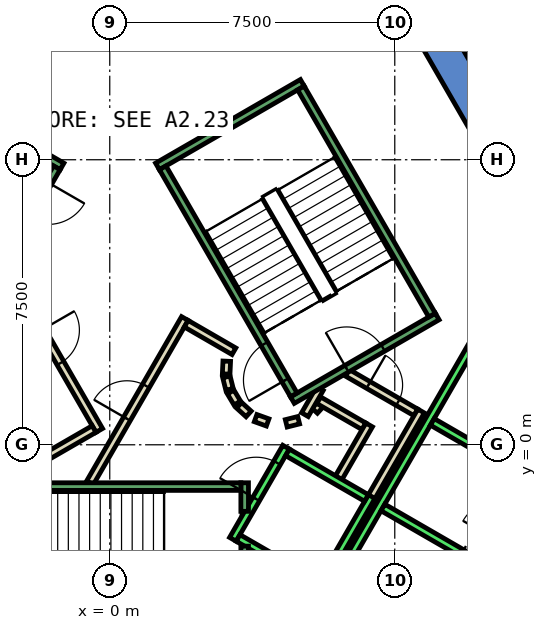
"""IFC4 building model, lengths in metres.
Left out: names, types, materials, properties, quantities, classifications, styles, units other than length and angle.
Written with IfcOpenShell. Run it as: python <this file> out.ifc"""

import sys

from ifc_helpers import new_model, si_unit, direction, frame, frame_2d, origin, place, context, subcontext, project, spatial, polyline, rectangle, outline, extrude, element, fill, save


model = new_model("IFC4")
c1 = context("Model", 3, precision=1e-05, world=origin(), true_north=direction((0.0, 1.0)))
c2 = subcontext(c1, "Body", "Model", "MODEL_VIEW")
j1 = project(units=[si_unit("LENGTHUNIT", "METRE"), si_unit("PLANEANGLEUNIT", "RADIAN")], contexts=[c1])
p1 = place(None, origin())
s1 = spatial("IfcSite", under=j1, at=p1, CompositionType="ELEMENT")
p2 = place(p1, origin())
s2 = spatial("IfcBuilding", under=s1, at=p2, CompositionType="ELEMENT")
p3 = place(p2, frame((0.0, 0.0, 111.8)))
s3 = spatial("IfcBuildingStorey", under=s2, at=p3, CompositionType="ELEMENT", Elevation=111.8)
p4 = place(p3, frame((0.0, 0.0, -0.4)))
e1 = element("IfcWall", 1, at=p4, inside=s3, PredefinedType="SHEAR", context=c2, shape_type="SweptSolid", body=[
    extrude(outline(polyline([(8.517, 11.748), (7.738, 11.298), (12.817, 2.5), (13.856, 2.5), (8.517, 11.748)])), origin(), (0.0, 0.0, 1.0), 4.2),
])
p5 = place(p3, frame((0.0, 0.0, -0.4)))
e2 = element("IfcWall", 2, at=p5, inside=s3, PredefinedType="SHEAR", context=c2, shape_type="SweptSolid", body=[
    extrude(outline(polyline([(10.717, -2.937), (9.938, -2.487), (9.288, -3.613), (10.067, -4.063), (10.717, -2.937)])), origin(), (0.0, 0.0, 1.0), 4.2),
])
p6 = place(p3, frame((5.39, 0.898, 0.0), z_axis=(0.0, 0.0, 1.0), x_axis=(0.673828488714, 0.738887791073, 0.0)))
e3 = element("IfcWall", 3, at=p6, inside=s3, PredefinedType="PARTITIONING", context=c2, shape_type="SweptSolid", body=[
    extrude(rectangle(XDim=0.263, YDim=0.2, at=frame_2d((0.131, 0.0))), origin(), (0.0, 0.0, 1.0), 3.8),
])
p7 = place(p3, frame((5.499, 1.172, 0.0), z_axis=(0.0, 0.0, 1.0), x_axis=(0.866333505267, -0.499465972466, 0.0)))
e4 = element("IfcWall", 4, at=p7, inside=s3, PredefinedType="PARTITIONING", context=c2, shape_type="SweptSolid", body=[
    extrude(rectangle(XDim=1.374, YDim=0.2, at=frame_2d((0.687, 0.0))), origin(), (0.0, 0.0, 1.0), 3.8),
])
p8 = place(p3, frame((6.826, 0.522, 0.0), z_axis=(0.0, 0.0, 1.0), x_axis=(-0.500016722714, -0.866015748706, 0.0)))
e5 = element("IfcWall", 5, at=p8, inside=s3, PredefinedType="PARTITIONING", context=c2, shape_type="SweptSolid", body=[
    extrude(rectangle(XDim=1.7, YDim=0.2, at=frame_2d((0.85, 0.0))), origin(), (0.0, 0.0, 1.0), 3.8),
])
p9 = place(p3, frame((6.25, 1.894, 0.0), z_axis=(0.0, 0.0, 1.0), x_axis=(0.866043184279, -0.499969202016, 0.0)))
e6 = element("IfcWall", 6, at=p9, inside=s3, PredefinedType="PARTITIONING", context=c2, shape_type="SweptSolid", body=[
    extrude(rectangle(XDim=2.084, YDim=0.2, at=frame_2d((1.042, 0.0))), origin(), (0.0, 0.0, 1.0), 3.8),
])
p10 = place(p9, frame((0.642, 0.0, 0.0)))
e7 = element("IfcOpeningElement", 7, at=p10, cuts=e6, PredefinedType="OPENING", context=c2, shape_type="SweptSolid", body=[
    extrude(rectangle(XDim=0.9, YDim=2.1, at=frame_2d((0.45, 1.05))), frame((0.0, 0.11, 0.0), z_axis=(0.0, -1.0, 0.0), x_axis=(1.0, 0.0, 0.0)), (0.0, 0.0, 1.0), 0.22),
])
p11 = place(p3, frame((8.192, 0.888, 0.0), z_axis=(0.0, 0.0, 1.0), x_axis=(-0.499940625693, -0.866059680843, 0.0)))
e8 = element("IfcWall", 8, at=p11, inside=s3, PredefinedType="PARTITIONING", context=c2, shape_type="SweptSolid", body=[
    extrude(rectangle(XDim=2.68, YDim=0.2, at=frame_2d((1.34, 0.0))), origin(), (0.0, 0.0, 1.0), 3.8),
])
p12 = place(p3, frame((5.135, 0.793, 0.0), z_axis=(0.0, 0.0, 1.0), x_axis=(0.499526442893, 0.866298639529, 0.0)))
e9 = element("IfcWall", 9, at=p12, inside=s3, PredefinedType="PARTITIONING", context=c2, shape_type="SweptSolid", body=[
    extrude(rectangle(XDim=0.791, YDim=0.2, at=frame_2d((0.396, 0.0))), origin(), (0.0, 0.0, 1.0), 3.8),
])
p13 = place(p3, frame((-0.52, -1.0, 0.0), z_axis=(0.0, 0.0, 1.0), x_axis=(0.50011622646, 0.865958290007, 0.0)))
e10 = element("IfcWall", 10, at=p13, inside=s3, PredefinedType="PARTITIONING", context=c2, shape_type="SweptSolid", body=[
    extrude(rectangle(XDim=4.991, YDim=0.2, at=frame_2d((2.496, 0.0))), origin(), (0.0, 0.0, 1.0), 3.8),
])
p14 = place(p13, frame((1.945, 0.0, 0.0)))
e11 = element("IfcOpeningElement", 11, at=p14, cuts=e10, PredefinedType="OPENING", context=c2, shape_type="SweptSolid", body=[
    extrude(rectangle(XDim=1.0, YDim=2.1, at=frame_2d((0.5, 1.05))), frame((0.0, 0.11, 0.0), z_axis=(0.0, -1.0, 0.0), x_axis=(1.0, 0.0, 0.0)), (0.0, 0.0, 1.0), 0.22),
])
p15 = place(p3, frame((2.012, 3.186, 0.0), z_axis=(0.0, 0.0, 1.0), x_axis=(0.865891012941, -0.500232699559, 0.0)))
e12 = element("IfcWall", 12, at=p15, inside=s3, PredefinedType="PARTITIONING", context=c2, shape_type="SweptSolid", body=[
    extrude(rectangle(XDim=1.449, YDim=0.2, at=frame_2d((0.725, 0.0))), origin(), (0.0, 0.0, 1.0), 3.8),
])
p16 = place(p3, frame((3.079, 2.199, 0.0), z_axis=(0.0, 0.0, 1.0), x_axis=(-0.047771483479, -0.998858290933, 0.0)))
e13 = element("IfcWall", 13, at=p16, inside=s3, PredefinedType="PARTITIONING", context=c2, shape_type="SweptSolid", body=[
    extrude(rectangle(XDim=0.337, YDim=0.2, at=frame_2d((0.169, 0.0))), origin(), (0.0, 0.0, 1.0), 3.8),
])
p17 = place(p3, frame((3.07, 1.786, 0.0), z_axis=(0.0, 0.0, 1.0), x_axis=(0.242705583207, -0.970099994784, 0.0)))
e14 = element("IfcWall", 14, at=p17, inside=s3, PredefinedType="PARTITIONING", context=c2, shape_type="SweptSolid", body=[
    extrude(rectangle(XDim=0.338, YDim=0.2, at=frame_2d((0.169, 0.0))), origin(), (0.0, 0.0, 1.0), 3.8),
])
for number, where, z_axis, x_axis in (
    (15, (3.182, 1.388, 0.0), (0.0, 0.0, 1.0), (0.512, -0.859, 0.0)),
    (16, (3.404, 1.039, 0.0), (0.0, 0.0, 1.0), (0.74, -0.672, 0.0)),
):
    element("IfcWall", number, at=place(p3, frame(where, z_axis=z_axis, x_axis=x_axis)), inside=s3, PredefinedType="PARTITIONING", context=c2, shape_type="SweptSolid", body=[
        extrude(rectangle(XDim=0.338, YDim=0.2, at=frame_2d((0.169, 0.0))), origin(), (0.0, 0.0, 1.0), 3.8),
    ])
p18 = place(p3, frame((3.838, 0.702, 0.0), z_axis=(0.0, 0.0, 1.0), x_axis=(0.941035081519, -0.338308993895, 0.0)))
e17 = element("IfcWall", 17, at=p18, inside=s3, PredefinedType="PARTITIONING", context=c2, shape_type="SweptSolid", body=[
    extrude(rectangle(XDim=0.337, YDim=0.2, at=frame_2d((0.168, 0.0))), origin(), (0.0, 0.0, 1.0), 3.8),
])
p19 = place(p3, frame((4.644, 0.564, 0.0), z_axis=(0.0, 0.0, 1.0), x_axis=(0.969929076366, 0.243387729394, 0.0)))
e18 = element("IfcWall", 18, at=p19, inside=s3, PredefinedType="PARTITIONING", context=c2, shape_type="SweptSolid", body=[
    extrude(rectangle(XDim=0.337, YDim=0.2, at=frame_2d((0.168, 0.0))), origin(), (0.0, 0.0, 1.0), 3.8),
])
p20 = place(p3, frame((-2.771, 4.7, 0.0), z_axis=(0.0, 0.0, 1.0), x_axis=(0.499969479948, -0.866043023828, 0.0)))
e19 = element("IfcWall", 19, at=p20, inside=s3, PredefinedType="PARTITIONING", context=c2, shape_type="SweptSolid", body=[
    extrude(rectangle(XDim=4.99, YDim=0.2, at=frame_2d((2.495, 0.0))), origin(), (0.0, 0.0, 1.0), 3.8),
])
p21 = place(p20, frame((1.945, 0.0, 0.0)))
e20 = element("IfcOpeningElement", 20, at=p21, cuts=e19, PredefinedType="OPENING", context=c2, shape_type="SweptSolid", body=[
    extrude(rectangle(XDim=1.0, YDim=2.1, at=frame_2d((0.5, 1.05))), frame((0.0, 0.11, 0.0), z_axis=(0.0, -1.0, 0.0), x_axis=(1.0, 0.0, 0.0)), (0.0, 0.0, 1.0), 0.22),
])
p22 = place(p3, frame((-0.412, 0.414, 0.0), z_axis=(0.0, 0.0, 1.0), x_axis=(-0.866017369001, -0.500013916395, 0.0)))
e21 = element("IfcWall", 21, at=p22, inside=s3, PredefinedType="PARTITIONING", context=c2, shape_type="SweptSolid", body=[
    extrude(rectangle(XDim=1.45, YDim=0.2, at=frame_2d((0.725, 0.0))), origin(), (0.0, 0.0, 1.0), 3.8),
])
p23 = place(p3, frame((3.24, -2.488, 0.0), z_axis=(0.0, 0.0, 1.0), x_axis=(0.49994636267, 0.866056369097, 0.0)))
e22 = element("IfcWall", 22, at=p23, inside=s3, PredefinedType="STANDARD", context=c2, shape_type="SweptSolid", body=[
    extrude(rectangle(XDim=2.8, YDim=0.2, at=frame_2d((1.4, 0.0))), origin(), (0.0, 0.0, 1.0), 3.8),
])
p24 = place(p23, frame((1.225, 0.0, 0.0)))
e23 = element("IfcOpeningElement", 23, at=p24, cuts=e22, PredefinedType="OPENING", context=c2, shape_type="SweptSolid", body=[
    extrude(rectangle(XDim=1.1, YDim=2.1, at=frame_2d((0.55, 1.05))), frame((0.0, 0.11, 0.0), z_axis=(0.0, -1.0, 0.0), x_axis=(1.0, 0.0, 0.0)), (0.0, 0.0, 1.0), 0.22),
])
p25 = place(p3, frame((5.492, -3.788, 0.0), z_axis=(0.0, 0.0, 1.0), x_axis=(0.500011755427, 0.866018616679, 0.0)))
e24 = element("IfcWall", 24, at=p25, inside=s3, PredefinedType="STANDARD", context=c2, shape_type="SweptSolid", body=[
    extrude(rectangle(XDim=2.8, YDim=0.2, at=frame_2d((1.4, 0.0))), origin(), (0.0, 0.0, 1.0), 3.8),
])
p26 = place(p3, frame((3.377, -2.452, 0.0), z_axis=(0.0, 0.0, 1.0), x_axis=(0.865955154139, -0.50012165622, 0.0)))
e25 = element("IfcWall", 25, at=p26, inside=s3, PredefinedType="STANDARD", context=c2, shape_type="SweptSolid", body=[
    extrude(rectangle(XDim=2.4, YDim=0.2, at=frame_2d((1.2, 0.0))), origin(), (0.0, 0.0, 1.0), 3.8),
])
p27 = place(p3, frame((4.677, -0.2, 0.0), z_axis=(0.0, 0.0, 1.0), x_axis=(0.865973769406, -0.500089422704, 0.0)))
e26 = element("IfcWall", 26, at=p27, inside=s3, PredefinedType="STANDARD", context=c2, shape_type="SweptSolid", body=[
    extrude(rectangle(XDim=2.399, YDim=0.2, at=frame_2d((1.2, 0.0))), origin(), (0.0, 0.0, 1.0), 3.8),
])
p28 = place(p3, frame((4.451, -6.19, 0.0), z_axis=(0.0, 0.0, 1.0), x_axis=(0.50000090737, 0.866024879913, 0.0)))
e27 = element("IfcWall", 27, at=p28, inside=s3, PredefinedType="STANDARD", context=c2, shape_type="SweptSolid", body=[
    extrude(rectangle(XDim=10.6, YDim=0.2, at=frame_2d((5.3, 0.0))), origin(), (0.0, 0.0, 1.0), 3.8),
])
for number, where, z_axis, x_axis in (
    (28, (7.188, -1.65, 0.0), (0.0, 0.0, 1.0), (0.866, -0.5, 0.0)),
    (29, (8.488, 0.602, 0.0), (0.0, 0.0, 1.0), (0.866, -0.5, 0.0)),
):
    element("IfcWall", number, at=place(p3, frame(where, z_axis=z_axis, x_axis=x_axis)), inside=s3, PredefinedType="STANDARD", context=c2, shape_type="SweptSolid", body=[
        extrude(rectangle(XDim=2.5, YDim=0.2, at=frame_2d((1.25, 0.0))), origin(), (0.0, 0.0, 1.0), 3.8),
    ])
p29 = place(p3, frame((3.55, -2.667, 0.0), z_axis=(0.0, 0.0, 1.0), x_axis=(0.0, -1.0, 0.0)))
e30 = element("IfcWall", 30, at=p29, inside=s3, PredefinedType="STANDARD", context=c2, shape_type="SweptSolid", body=[
    extrude(rectangle(XDim=2.733, YDim=0.2, at=frame_2d((1.366, 0.0))), origin(), (0.0, 0.0, 1.0), 3.8),
])
p30 = place(p3, frame((3.55, -1.0, 0.0), z_axis=(0.0, 0.0, 1.0), x_axis=(0.0, -1.0, 0.0)))
e31 = element("IfcWall", 31, at=p30, inside=s3, PredefinedType="STANDARD", context=c2, shape_type="SweptSolid", body=[
    extrude(rectangle(XDim=0.751, YDim=0.2, at=frame_2d((0.375, 0.0))), origin(), (0.0, 0.0, 1.0), 3.8),
])
p31 = place(p3, frame((-3.45, -1.1, 0.0), z_axis=(0.0, 0.0, 1.0), x_axis=(1.0, 0.0, 0.0)))
e32 = element("IfcWall", 32, at=p31, inside=s3, PredefinedType="STANDARD", context=c2, shape_type="SweptSolid", body=[
    extrude(rectangle(XDim=6.9, YDim=0.2, at=frame_2d((3.45, 0.0))), origin(), (0.0, 0.0, 1.0), 3.8),
])
p32 = place(p31, frame((0.45, 0.0, 0.0)))
e33 = element("IfcOpeningElement", 33, at=p32, cuts=e32, PredefinedType="OPENING", context=c2, shape_type="SweptSolid", body=[
    extrude(rectangle(XDim=1.1, YDim=2.2, at=frame_2d((0.55, 1.1))), frame((0.0, 0.11, 0.0), z_axis=(0.0, -1.0, 0.0), x_axis=(1.0, 0.0, 0.0)), (0.0, 0.0, 1.0), 0.22),
])
p33 = place(p3, frame((4.806, 1.176, 0.0), z_axis=(0.0, 0.0, 1.0), x_axis=(0.866059941101, 0.499940174841, 0.0)))
e34 = element("IfcWall", 34, at=p33, inside=s3, PredefinedType="STANDARD", context=c2, shape_type="SweptSolid", body=[
    extrude(rectangle(XDim=4.4, YDim=0.2, at=frame_2d((2.2, 0.0))), origin(), (0.0, 0.0, 1.0), 3.8),
])
p34 = place(p33, frame((1.65, 0.0, 0.0)))
e35 = element("IfcOpeningElement", 35, at=p34, cuts=e34, PredefinedType="OPENING", context=c2, shape_type="SweptSolid", body=[
    extrude(rectangle(XDim=1.1, YDim=2.2, at=frame_2d((0.55, 1.1))), frame((0.0, 0.11, 0.0), z_axis=(0.0, -1.0, 0.0), x_axis=(1.0, 0.0, 0.0)), (0.0, 0.0, 1.0), 0.22),
])
p35 = place(p3, frame((1.256, 7.324, 0.0), z_axis=(0.0, 0.0, 1.0), x_axis=(0.866046073146, 0.499964197906, 0.0)))
e36 = element("IfcWall", 36, at=p35, inside=s3, PredefinedType="STANDARD", context=c2, shape_type="SweptSolid", body=[
    extrude(rectangle(XDim=4.4, YDim=0.2, at=frame_2d((2.2, 0.0))), origin(), (0.0, 0.0, 1.0), 3.8),
])
p36 = place(p3, frame((4.843, 1.312, 0.0), z_axis=(0.0, 0.0, 1.0), x_axis=(-0.499963383562, 0.866046543262, 0.0)))
e37 = element("IfcWall", 37, at=p36, inside=s3, PredefinedType="STANDARD", context=c2, shape_type="SweptSolid", body=[
    extrude(rectangle(XDim=6.9, YDim=0.2, at=frame_2d((3.45, 0.0))), origin(), (0.0, 0.0, 1.0), 3.8),
])
p37 = place(p36, frame((0.45, 0.0, 0.0)))
e38 = element("IfcOpeningElement", 38, at=p37, cuts=e37, PredefinedType="OPENING", context=c2, shape_type="SweptSolid", body=[
    extrude(rectangle(XDim=1.1, YDim=2.2, at=frame_2d((0.55, 1.1))), frame((0.0, 0.11, 0.0), z_axis=(0.0, -1.0, 0.0), x_axis=(1.0, 0.0, 0.0)), (0.0, 0.0, 1.0), 0.22),
])
p38 = place(p3, frame((8.48, 3.412, 0.0), z_axis=(0.0, 0.0, 1.0), x_axis=(-0.499978703459, 0.866037698999, 0.0)))
e39 = element("IfcWall", 39, at=p38, inside=s3, PredefinedType="STANDARD", context=c2, shape_type="SweptSolid", body=[
    extrude(rectangle(XDim=6.9, YDim=0.2, at=frame_2d((3.45, 0.0))), origin(), (0.0, 0.0, 1.0), 3.8),
])
p39 = place(p3, frame((-1.256, 7.324, 0.0), z_axis=(0.0, 0.0, 1.0), x_axis=(-0.866046073146, 0.499964197906, 0.0)))
e40 = element("IfcWall", 40, at=p39, inside=s3, PredefinedType="STANDARD", context=c2, shape_type="SweptSolid", body=[
    extrude(rectangle(XDim=4.4, YDim=0.2, at=frame_2d((2.2, 0.0))), origin(), (0.0, 0.0, 1.0), 3.8),
])
p40 = place(p39, frame((1.65, 0.0, 0.0)))
e41 = element("IfcOpeningElement", 41, at=p40, cuts=e40, PredefinedType="OPENING", context=c2, shape_type="SweptSolid", body=[
    extrude(rectangle(XDim=1.1, YDim=2.2, at=frame_2d((0.55, 1.1))), frame((0.0, 0.11, 0.0), z_axis=(0.0, -1.0, 0.0), x_axis=(1.0, 0.0, 0.0)), (0.0, 0.0, 1.0), 0.22),
])
p41 = place(p3, frame((-1.393, 7.288, 0.0), z_axis=(0.0, 0.0, 1.0), x_axis=(-0.499963383562, -0.866046543262, 0.0)))
e42 = element("IfcWall", 42, at=p41, inside=s3, PredefinedType="STANDARD", context=c2, shape_type="SweptSolid", body=[
    extrude(rectangle(XDim=6.9, YDim=0.2, at=frame_2d((3.45, 0.0))), origin(), (0.0, 0.0, 1.0), 3.8),
])
p42 = place(p41, frame((0.45, 0.0, 0.0)))
e43 = element("IfcOpeningElement", 43, at=p42, cuts=e42, PredefinedType="OPENING", context=c2, shape_type="SweptSolid", body=[
    extrude(rectangle(XDim=1.1, YDim=2.2, at=frame_2d((0.55, 1.1))), frame((0.0, 0.11, 0.0), z_axis=(0.0, -1.0, 0.0), x_axis=(1.0, 0.0, 0.0)), (0.0, 0.0, 1.0), 0.22),
])
p43 = place(p14, origin())
e44 = element("IfcDoor", 44, at=p43, inside=s3, OperationType="SINGLE_SWING_LEFT", PredefinedType="DOOR", context=c2, shape_type="SweptSolid", body=[
    extrude(rectangle(XDim=1.0, YDim=2.1, at=frame_2d((0.5, 1.05))), frame((0.0, 0.025, 0.0), z_axis=(0.0, -1.0, 0.0), x_axis=(1.0, 0.0, 0.0)), (0.0, 0.0, 1.0), 0.05),
])
fill(e11, e44)
p44 = place(p21, origin())
e45 = element("IfcDoor", 45, at=p44, inside=s3, OperationType="SINGLE_SWING_RIGHT", PredefinedType="DOOR", context=c2, shape_type="SweptSolid", body=[
    extrude(rectangle(XDim=1.0, YDim=2.1, at=frame_2d((0.5, 1.05))), frame((0.0, 0.025, 0.0), z_axis=(0.0, -1.0, 0.0), x_axis=(1.0, 0.0, 0.0)), (0.0, 0.0, 1.0), 0.05),
])
fill(e20, e45)
p45 = place(p10, origin())
e46 = element("IfcDoor", 46, at=p45, inside=s3, OperationType="SINGLE_SWING_LEFT", PredefinedType="DOOR", context=c2, shape_type="SweptSolid", body=[
    extrude(rectangle(XDim=0.9, YDim=2.1, at=frame_2d((0.45, 1.05))), frame((0.0, 0.025, 0.0), z_axis=(0.0, -1.0, 0.0), x_axis=(1.0, 0.0, 0.0)), (0.0, 0.0, 1.0), 0.05),
])
fill(e7, e46)
p46 = place(p24, origin())
e47 = element("IfcDoor", 47, at=p46, inside=s3, OperationType="SLIDING_TO_LEFT", PredefinedType="DOOR", context=c2, shape_type="SweptSolid", body=[
    extrude(rectangle(XDim=1.1, YDim=2.1, at=frame_2d((0.55, 1.05))), frame((0.0, 0.025, 0.0), z_axis=(0.0, -1.0, 0.0), x_axis=(1.0, 0.0, 0.0)), (0.0, 0.0, 1.0), 0.05),
])
fill(e23, e47)
p47 = place(p37, origin())
e48 = element("IfcDoor", 48, at=p47, inside=s3, OperationType="SINGLE_SWING_LEFT", PredefinedType="DOOR", context=c2, shape_type="SweptSolid", body=[
    extrude(rectangle(XDim=1.1, YDim=2.2, at=frame_2d((0.55, 1.1))), frame((0.0, 0.025, 0.0), z_axis=(0.0, -1.0, 0.0), x_axis=(1.0, 0.0, 0.0)), (0.0, 0.0, 1.0), 0.05),
])
fill(e38, e48)
p48 = place(p34, origin())
e49 = element("IfcDoor", 49, at=p48, inside=s3, OperationType="SINGLE_SWING_LEFT", PredefinedType="DOOR", context=c2, shape_type="SweptSolid", body=[
    extrude(rectangle(XDim=1.1, YDim=2.2, at=frame_2d((0.55, 1.1))), frame((0.0, 0.025, 0.0), z_axis=(0.0, -1.0, 0.0), x_axis=(1.0, 0.0, 0.0)), (0.0, 0.0, 1.0), 0.05),
])
fill(e35, e49)
save(model, sys.argv[1])
